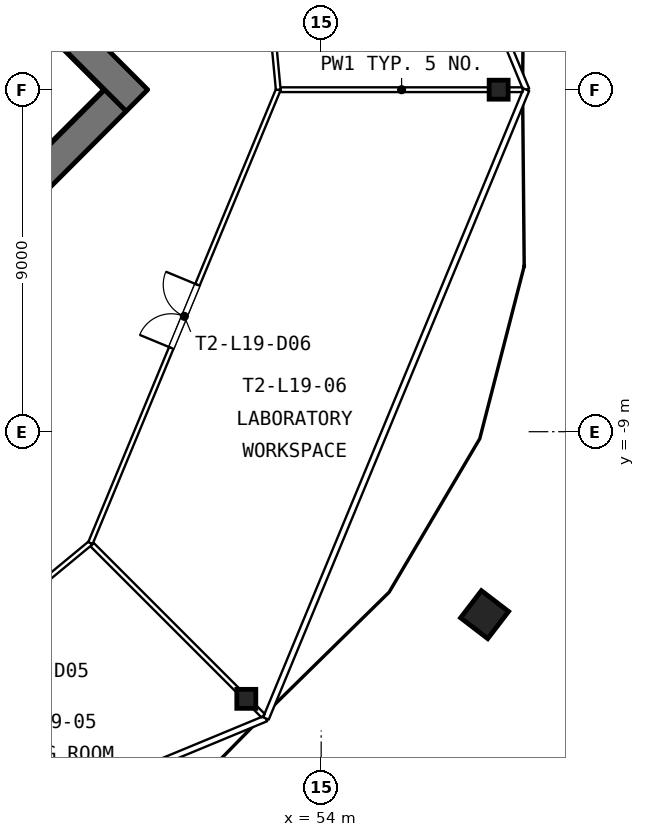
"""IFC4 building model, lengths in metres.
Left out: names, types, materials, properties, quantities, classifications, styles, units other than length and angle.
Written with IfcOpenShell. Run it as: python <this file> out.ifc"""

import sys

from ifc_helpers import new_model, si_unit, direction, frame, frame_2d, origin, origin_2d, place, context, subcontext, project, spatial, rectangle, hollow_rectangle, extrude, element, fill, save


model = new_model("IFC4")
c1 = context("Model", 3, precision=1e-05, world=origin(), true_north=direction((0.0, 1.0)))
c2 = subcontext(c1, "Body", "Model", "MODEL_VIEW")
j1 = project(units=[si_unit("LENGTHUNIT", "METRE"), si_unit("PLANEANGLEUNIT", "RADIAN")], contexts=[c1])
p1 = place(None, origin())
s1 = spatial("IfcSite", under=j1, at=p1, CompositionType="ELEMENT")
p2 = place(p1, origin())
s2 = spatial("IfcBuilding", under=s1, at=p2, CompositionType="ELEMENT")
p3 = place(p2, frame((0.0, 0.0, 84.0)))
s3 = spatial("IfcBuildingStorey", under=s2, at=p3, CompositionType="ELEMENT", Elevation=84.0)
for number, where, z_axis, x_axis in (
    (1, (58.67, 0.0, 0.0), (0.0, 0.0, 1.0), (1.0, 0.0, 0.0)),
    (2, (52.03, -16.03, 0.0), (0.0, 0.0, 1.0), (1.0, 0.0, 0.0)),
):
    element("IfcColumn", number, at=place(p3, frame(where, z_axis=z_axis, x_axis=x_axis)), inside=s3, PredefinedType="COLUMN", context=c2, shape_type="SweptSolid", body=[
        extrude(hollow_rectangle(XDim=0.5, YDim=0.5, WallThickness=0.03, at=origin_2d()), origin(), (0.0, 0.0, 1.0), 3.9),
    ])
p4 = place(p3, frame((36.283, -12.586, 0.0), z_axis=(0.0, 0.0, 1.0), x_axis=(0.707106781187, 0.707106781187, 0.0)))
e3 = element("IfcWall", 3, at=p4, inside=s3, PredefinedType="SHEAR", context=c2, shape_type="SweptSolid", body=[
    extrude(rectangle(XDim=17.4, YDim=0.8, at=frame_2d((8.7, 0.0))), origin(), (0.0, 0.0, 1.0), 3.6),
])
p5 = place(p4, frame((7.3, 0.0, 0.0)))
e4 = element("IfcOpeningElement", 4, at=p5, cuts=e3, PredefinedType="OPENING", context=c2, shape_type="SweptSolid", body=[
    extrude(rectangle(XDim=1.2, YDim=2.1, at=frame_2d((0.6, 1.05))), frame((0.0, 0.41, 0.0), z_axis=(0.0, -1.0, 0.0), x_axis=(1.0, 0.0, 0.0)), (0.0, 0.0, 1.0), 0.82),
])
p6 = place(p4, frame((0.25, 0.0, 0.0)))
e5 = element("IfcOpeningElement", 5, at=p6, cuts=e3, PredefinedType="OPENING", context=c2, shape_type="SweptSolid", body=[
    extrude(rectangle(XDim=0.9, YDim=2.1, at=frame_2d((0.45, 1.05))), frame((0.0, 0.41, 0.0), z_axis=(0.0, -1.0, 0.0), x_axis=(1.0, 0.0, 0.0)), (0.0, 0.0, 1.0), 0.82),
])
p7 = place(p4, frame((1.75, 0.0, 0.0)))
e6 = element("IfcOpeningElement", 6, at=p7, cuts=e3, PredefinedType="OPENING", context=c2, shape_type="SweptSolid", body=[
    extrude(rectangle(XDim=0.9, YDim=2.1, at=frame_2d((0.45, 1.05))), frame((0.0, 0.41, 0.0), z_axis=(0.0, -1.0, 0.0), x_axis=(1.0, 0.0, 0.0)), (0.0, 0.0, 1.0), 0.82),
])
p8 = place(p3, frame((49.152, -0.283, 0.0), z_axis=(0.0, 0.0, 1.0), x_axis=(-0.707106781187, 0.707106781187, 0.0)))
e7 = element("IfcWall", 7, at=p8, inside=s3, PredefinedType="SHEAR", context=c2, shape_type="SweptSolid", body=[
    extrude(rectangle(XDim=19.0, YDim=0.8, at=frame_2d((9.5, 0.0))), origin(), (0.0, 0.0, 1.0), 3.6),
])
p9 = place(p8, frame((8.3, 0.0, 0.0)))
e8 = element("IfcOpeningElement", 8, at=p9, cuts=e7, PredefinedType="OPENING", context=c2, shape_type="SweptSolid", body=[
    extrude(rectangle(XDim=2.4, YDim=2.1, at=frame_2d((1.2, 1.05))), frame((0.0, 0.41, 0.0), z_axis=(0.0, -1.0, 0.0), x_axis=(1.0, 0.0, 0.0)), (0.0, 0.0, 1.0), 0.82),
])
for number, where, z_axis, x_axis in (
    (9, (59.299, 0.0, 0.0), (0.0, 0.0, 1.0), (-1.0, 0.0, 0.0)),
    (10, (52.475, -16.475, 0.0), (0.0, 0.0, 1.0), (-0.707, 0.707, 0.0)),
):
    element("IfcWall", number, at=place(p3, frame(where, z_axis=z_axis, x_axis=x_axis)), inside=s3, PredefinedType="PARTITIONING", context=c2, shape_type="SweptSolid", body=[
        extrude(rectangle(XDim=6.366, YDim=0.125, at=frame_2d((3.183, 0.0))), origin(), (0.0, 0.0, 1.0), 2.4),
    ])
p10 = place(p3, frame((42.724, -16.234, 0.0), z_axis=(0.0, 0.0, 1.0), x_axis=(0.77059508797, 0.63732504297, 0.0)))
e11 = element("IfcWall", 11, at=p10, inside=s3, PredefinedType="PARTITIONING", context=c2, shape_type="SweptSolid", body=[
    extrude(rectangle(XDim=6.754, YDim=0.125, at=frame_2d((3.377, 0.0))), origin(), (0.0, 0.0, 1.0), 3.0),
])
p11 = place(p10, frame((2.877, 0.0, 0.0)))
e12 = element("IfcOpeningElement", 12, at=p11, cuts=e11, PredefinedType="OPENING", context=c2, shape_type="SweptSolid", body=[
    extrude(rectangle(XDim=1.0, YDim=2.1, at=frame_2d((0.5, 1.05))), frame((0.0, 0.073, 0.0), z_axis=(0.0, -1.0, 0.0), x_axis=(1.0, 0.0, 0.0)), (0.0, 0.0, 1.0), 0.145),
])
p12 = place(p3, frame((47.929, -11.929, 0.0), z_axis=(0.0, 0.0, 1.0), x_axis=(0.382694679749, 0.923874873612, 0.0)))
e13 = element("IfcWall", 13, at=p12, inside=s3, PredefinedType="PARTITIONING", context=c2, shape_type="SweptSolid", body=[
    extrude(rectangle(XDim=12.912, YDim=0.125, at=frame_2d((6.456, 0.0))), origin(), (0.0, 0.0, 1.0), 3.0),
])
p13 = place(p12, frame((5.556, 0.0, 0.0)))
e14 = element("IfcOpeningElement", 14, at=p13, cuts=e13, PredefinedType="OPENING", context=c2, shape_type="SweptSolid", body=[
    extrude(rectangle(XDim=1.8, YDim=2.1, at=frame_2d((0.9, 1.05))), frame((0.0, 0.073, 0.0), z_axis=(0.0, -1.0, 0.0), x_axis=(1.0, 0.0, 0.0)), (0.0, 0.0, 1.0), 0.145),
])
p14 = place(p3, frame((52.871, 0.0, 0.0), z_axis=(0.0, 0.0, 1.0), x_axis=(-0.09426665702, 0.995546984011, 0.0)))
e15 = element("IfcWall", 15, at=p14, inside=s3, PredefinedType="PARTITIONING", context=c2, shape_type="SweptSolid", body=[
    extrude(rectangle(XDim=6.754, YDim=0.125, at=frame_2d((3.377, 0.0))), origin(), (0.0, 0.0, 1.0), 3.0),
])
p15 = place(p14, frame((2.877, 0.0, 0.0)))
e16 = element("IfcOpeningElement", 16, at=p15, cuts=e15, PredefinedType="OPENING", context=c2, shape_type="SweptSolid", body=[
    extrude(rectangle(XDim=1.0, YDim=2.1, at=frame_2d((0.5, 1.05))), frame((0.0, 0.073, 0.0), z_axis=(0.0, -1.0, 0.0), x_axis=(1.0, 0.0, 0.0)), (0.0, 0.0, 1.0), 0.145),
])
p16 = place(p13, origin())
e17 = element("IfcDoor", 17, at=p16, inside=s3, OperationType="DOUBLE_DOOR_DOUBLE_SWING", PredefinedType="DOOR", context=c2, shape_type="SweptSolid", body=[
    extrude(rectangle(XDim=1.8, YDim=2.1, at=frame_2d((0.9, 1.05))), frame((0.0, 0.025, 0.0), z_axis=(0.0, -1.0, 0.0), x_axis=(1.0, 0.0, 0.0)), (0.0, 0.0, 1.0), 0.05),
])
fill(e14, e17)
save(model, sys.argv[1])
